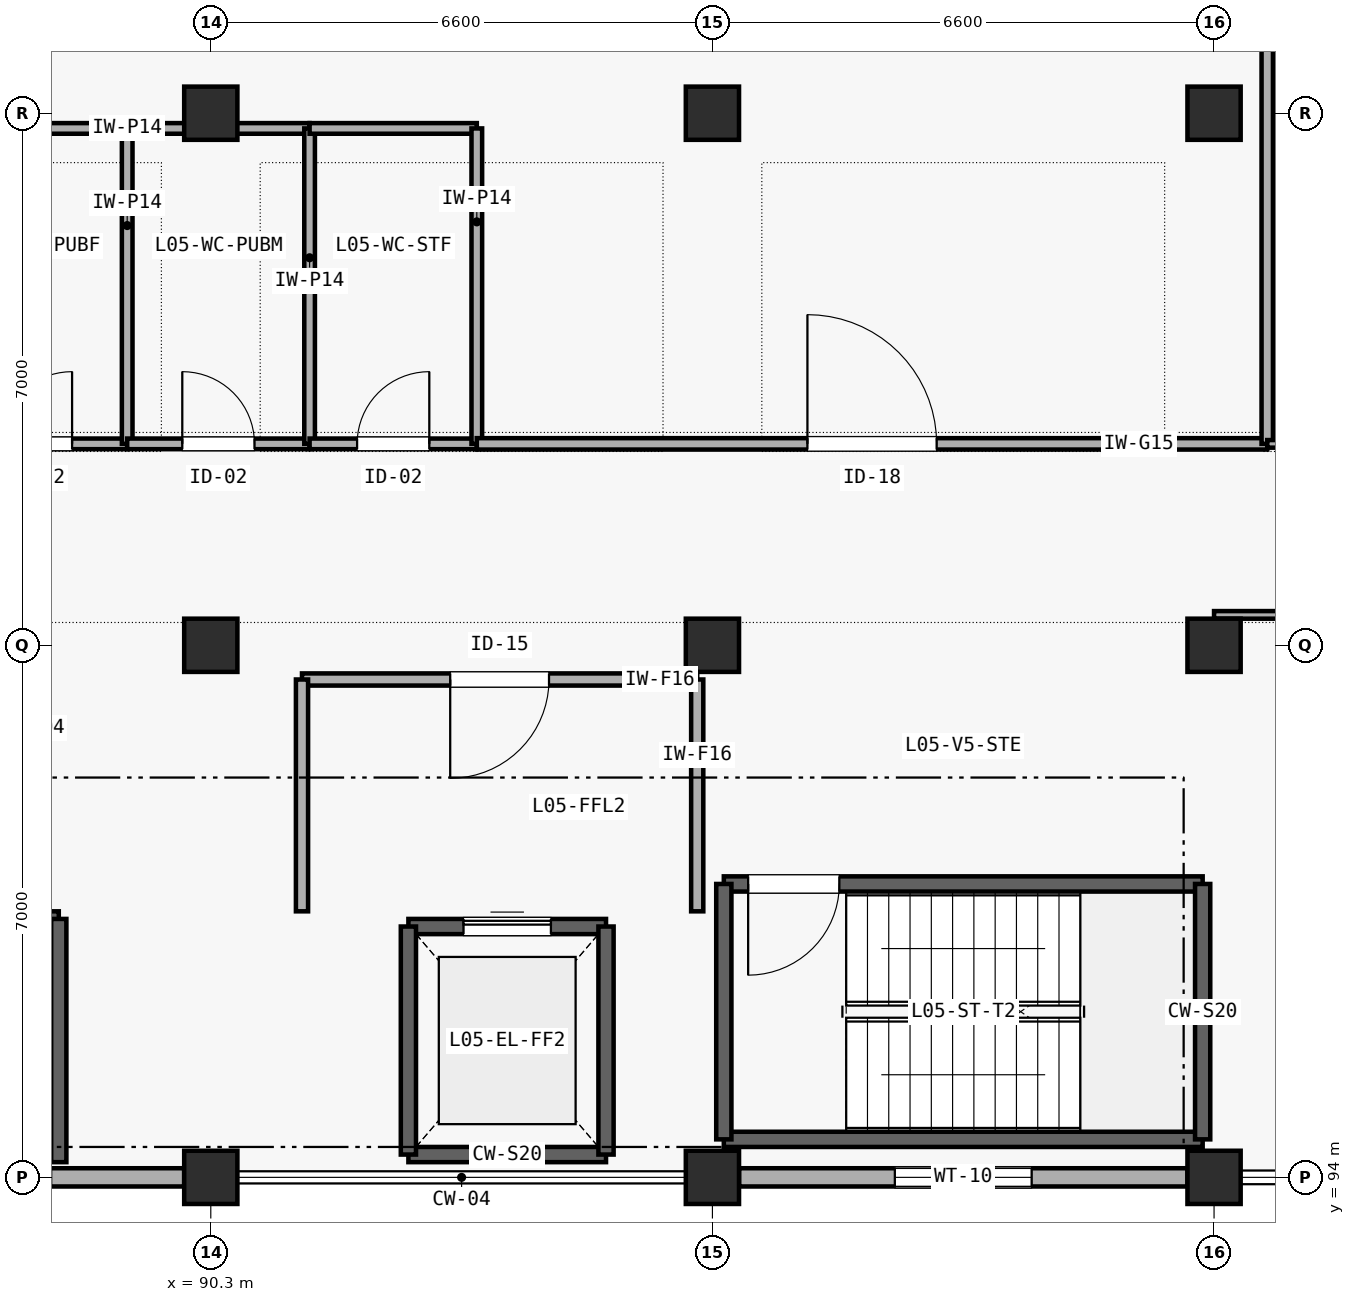
"""IFC4 building model, lengths in metres.
Left out: names, types, materials, properties, quantities, classifications, styles, units other than length and angle.
Written with IfcOpenShell. Run it as: python <this file> out.ifc"""

import sys

from ifc_helpers import new_model, si_unit, direction, frame, frame_2d, origin, origin_2d, place, context, subcontext, project, spatial, rectangle, extrude, element, fill, save


model = new_model("IFC4")
c1 = context("Model", 3, precision=1e-05, world=origin(), true_north=direction((0.0, 1.0)))
c2 = subcontext(c1, "Body", "Model", "MODEL_VIEW")
j1 = project(units=[si_unit("LENGTHUNIT", "METRE"), si_unit("PLANEANGLEUNIT", "RADIAN")], contexts=[c1])
p1 = place(None, origin())
s1 = spatial("IfcSite", under=j1, at=p1, CompositionType="ELEMENT")
p2 = place(p1, origin())
s2 = spatial("IfcBuilding", under=s1, at=p2, CompositionType="ELEMENT")
p3 = place(p2, frame((0.0, 0.0, 21.0)))
s3 = spatial("IfcBuildingStorey", under=s2, at=p3, CompositionType="ELEMENT", Elevation=21.0)
for number, where, z_axis, x_axis in (
    (1, (90.3, 94.0, 0.0), (0.0, 0.0, 1.0), (1.0, 0.0, 0.0)),
    (2, (90.3, 101.0, 0.0), (0.0, 0.0, 1.0), (1.0, 0.0, 0.0)),
    (3, (90.3, 108.0, 0.0), (0.0, 0.0, 1.0), (1.0, 0.0, 0.0)),
    (4, (96.9, 94.0, 0.0), (0.0, 0.0, 1.0), (1.0, 0.0, 0.0)),
    (5, (96.9, 101.0, 0.0), (0.0, 0.0, 1.0), (1.0, 0.0, 0.0)),
    (6, (96.9, 108.0, 0.0), (0.0, 0.0, 1.0), (1.0, 0.0, 0.0)),
    (7, (103.5, 94.0, 0.0), (0.0, 0.0, 1.0), (1.0, 0.0, 0.0)),
    (8, (103.5, 101.0, 0.0), (0.0, 0.0, 1.0), (1.0, 0.0, 0.0)),
    (9, (103.5, 108.0, 0.0), (0.0, 0.0, 1.0), (1.0, 0.0, 0.0)),
):
    element("IfcColumn", number, at=place(p3, frame(where, z_axis=z_axis, x_axis=x_axis)), inside=s3, PredefinedType="COLUMN", context=c2, shape_type="SweptSolid", body=[
        extrude(rectangle(XDim=0.7, YDim=0.7, at=origin_2d()), origin(), (0.0, 0.0, 1.0), 4.2),
    ])
p4 = place(p3, frame((84.05, 94.0, 0.0), z_axis=(0.0, 0.0, 1.0), x_axis=(1.0, 0.0, 0.0)))
e10 = element("IfcWall", 10, at=p4, inside=s3, PredefinedType="SOLIDWALL", context=c2, shape_type="SweptSolid", body=[
    extrude(rectangle(XDim=5.9, YDim=0.24, at=frame_2d((2.95, 0.0))), origin(), (0.0, 0.0, 1.0), 3.135),
])
p5 = place(p4, frame((1.75, 0.0, 0.85)))
e11 = element("IfcOpeningElement", 11, at=p5, cuts=e10, PredefinedType="OPENING", context=c2, shape_type="SweptSolid", body=[
    extrude(rectangle(XDim=2.4, YDim=1.35, at=frame_2d((1.2, 0.675))), frame((0.0, 0.13, 0.0), z_axis=(0.0, -1.0, 0.0), x_axis=(1.0, 0.0, 0.0)), (0.0, 0.0, 1.0), 0.26),
])
p6 = place(p3, frame((97.25, 94.0, 0.0), z_axis=(0.0, 0.0, 1.0), x_axis=(1.0, 0.0, 0.0)))
e12 = element("IfcWall", 12, at=p6, inside=s3, PredefinedType="SOLIDWALL", context=c2, shape_type="SweptSolid", body=[
    extrude(rectangle(XDim=5.9, YDim=0.24, at=frame_2d((2.95, 0.0))), origin(), (0.0, 0.0, 1.0), 3.235),
])
p7 = place(p6, frame((2.05, 0.0, 0.85)))
e13 = element("IfcOpeningElement", 13, at=p7, cuts=e12, PredefinedType="OPENING", context=c2, shape_type="SweptSolid", body=[
    extrude(rectangle(XDim=1.8, YDim=1.5, at=frame_2d((0.9, 0.75))), frame((0.0, 0.13, 0.0), z_axis=(0.0, -1.0, 0.0), x_axis=(1.0, 0.0, 0.0)), (0.0, 0.0, 1.0), 0.26),
])
p8 = place(p3, frame((97.05, 94.5, 0.0), z_axis=(0.0, 0.0, 1.0), x_axis=(1.0, 0.0, 0.0)))
e14 = element("IfcWall", 14, at=p8, inside=s3, PredefinedType="SHEAR", context=c2, shape_type="SweptSolid", body=[
    extrude(rectangle(XDim=6.3, YDim=0.2, at=frame_2d((3.15, 0.0))), origin(), (0.0, 0.0, 1.0), 4.2),
])
p9 = place(p3, frame((97.05, 97.86, 0.0), z_axis=(0.0, 0.0, 1.0), x_axis=(1.0, 0.0, 0.0)))
e15 = element("IfcWall", 15, at=p9, inside=s3, PredefinedType="SHEAR", context=c2, shape_type="SweptSolid", body=[
    extrude(rectangle(XDim=6.3, YDim=0.2, at=frame_2d((3.15, 0.0))), origin(), (0.0, 0.0, 1.0), 4.2),
])
p10 = place(p9, frame((0.32, 0.0, 0.0)))
e16 = element("IfcOpeningElement", 16, at=p10, cuts=e15, PredefinedType="OPENING", context=c2, shape_type="SweptSolid", body=[
    extrude(rectangle(XDim=1.2, YDim=2.15, at=frame_2d((0.6, 1.075))), frame((0.0, 0.11, 0.0), z_axis=(0.0, -1.0, 0.0), x_axis=(1.0, 0.0, 0.0)), (0.0, 0.0, 1.0), 0.22),
])
for number, where, z_axis, x_axis in (
    (17, (97.05, 94.5, 0.0), (0.0, 0.0, 1.0), (0.0, 1.0, 0.0)),
    (18, (103.35, 94.5, 0.0), (0.0, 0.0, 1.0), (0.0, 1.0, 0.0)),
):
    element("IfcWall", number, at=place(p3, frame(where, z_axis=z_axis, x_axis=x_axis)), inside=s3, PredefinedType="SHEAR", context=c2, shape_type="SweptSolid", body=[
        extrude(rectangle(XDim=3.36, YDim=0.2, at=frame_2d((1.68, 0.0))), origin(), (0.0, 0.0, 1.0), 4.2),
    ])
p11 = place(p3, frame((92.9, 94.3, 0.0), z_axis=(0.0, 0.0, 1.0), x_axis=(1.0, 0.0, 0.0)))
e19 = element("IfcWall", 19, at=p11, inside=s3, PredefinedType="SHEAR", context=c2, shape_type="SweptSolid", body=[
    extrude(rectangle(XDim=2.6, YDim=0.2, at=frame_2d((1.3, 0.0))), origin(), (0.0, 0.0, 1.0), 4.2),
])
p12 = place(p3, frame((92.9, 97.3, 0.0), z_axis=(0.0, 0.0, 1.0), x_axis=(1.0, 0.0, 0.0)))
e20 = element("IfcWall", 20, at=p12, inside=s3, PredefinedType="SHEAR", context=c2, shape_type="SweptSolid", body=[
    extrude(rectangle(XDim=2.6, YDim=0.2, at=frame_2d((1.3, 0.0))), origin(), (0.0, 0.0, 1.0), 4.2),
])
p13 = place(p12, frame((0.725, 0.0, 0.0)))
e21 = element("IfcOpeningElement", 21, at=p13, cuts=e20, PredefinedType="OPENING", context=c2, shape_type="SweptSolid", body=[
    extrude(rectangle(XDim=1.15, YDim=2.2, at=frame_2d((0.575, 1.1))), frame((0.0, 0.11, 0.0), z_axis=(0.0, -1.0, 0.0), x_axis=(1.0, 0.0, 0.0)), (0.0, 0.0, 1.0), 0.22),
])
for number, where, z_axis, x_axis in (
    (22, (92.9, 94.3, 0.0), (0.0, 0.0, 1.0), (0.0, 1.0, 0.0)),
    (23, (95.5, 94.3, 0.0), (0.0, 0.0, 1.0), (0.0, 1.0, 0.0)),
):
    element("IfcWall", number, at=place(p3, frame(where, z_axis=z_axis, x_axis=x_axis)), inside=s3, PredefinedType="SHEAR", context=c2, shape_type="SweptSolid", body=[
        extrude(rectangle(XDim=3.0, YDim=0.2, at=frame_2d((1.5, 0.0))), origin(), (0.0, 0.0, 1.0), 4.2),
    ])
p14 = place(p3, frame((85.7, 97.4, 0.0), z_axis=(0.0, 0.0, 1.0), x_axis=(1.0, 0.0, 0.0)))
e24 = element("IfcWall", 24, at=p14, inside=s3, PredefinedType="SHEAR", context=c2, shape_type="SweptSolid", body=[
    extrude(rectangle(XDim=2.6, YDim=0.2, at=frame_2d((1.3, 0.0))), origin(), (0.0, 0.0, 1.0), 4.2),
])
p15 = place(p14, frame((0.7, 0.0, 0.0)))
e25 = element("IfcOpeningElement", 25, at=p15, cuts=e24, PredefinedType="OPENING", context=c2, shape_type="SweptSolid", body=[
    extrude(rectangle(XDim=1.2, YDim=2.2, at=frame_2d((0.6, 1.1))), frame((0.0, 0.11, 0.0), z_axis=(0.0, -1.0, 0.0), x_axis=(1.0, 0.0, 0.0)), (0.0, 0.0, 1.0), 0.22),
])
p16 = place(p3, frame((88.3, 94.2, 0.0), z_axis=(0.0, 0.0, 1.0), x_axis=(0.0, 1.0, 0.0)))
e26 = element("IfcWall", 26, at=p16, inside=s3, PredefinedType="SHEAR", context=c2, shape_type="SweptSolid", body=[
    extrude(rectangle(XDim=3.2, YDim=0.2, at=frame_2d((1.6, 0.0))), origin(), (0.0, 0.0, 1.0), 4.2),
])
p17 = place(p3, frame((91.5, 100.55, 0.0), z_axis=(0.0, 0.0, 1.0), x_axis=(1.0, 0.0, 0.0)))
e27 = element("IfcWall", 27, at=p17, inside=s3, PredefinedType="SOLIDWALL", context=c2, shape_type="SweptSolid", body=[
    extrude(rectangle(XDim=5.2, YDim=0.16, at=frame_2d((2.6, 0.0))), origin(), (0.0, 0.0, 1.0), 3.9),
])
p18 = place(p17, frame((1.95, 0.0, 0.0)))
e28 = element("IfcOpeningElement", 28, at=p18, cuts=e27, PredefinedType="OPENING", context=c2, shape_type="SweptSolid", body=[
    extrude(rectangle(XDim=1.3, YDim=2.15, at=frame_2d((0.65, 1.075))), frame((0.0, 0.09, 0.0), z_axis=(0.0, -1.0, 0.0), x_axis=(1.0, 0.0, 0.0)), (0.0, 0.0, 1.0), 0.18),
])
p19 = place(p3, frame((91.5, 97.5, 0.0), z_axis=(0.0, 0.0, 1.0), x_axis=(0.0, 1.0, 0.0)))
e29 = element("IfcWall", 29, at=p19, inside=s3, PredefinedType="SOLIDWALL", context=c2, shape_type="SweptSolid", body=[
    extrude(rectangle(XDim=3.05, YDim=0.16, at=frame_2d((1.525, 0.0))), origin(), (0.0, 0.0, 1.0), 3.9),
])
p20 = place(p3, frame((96.7, 97.5, 0.0), z_axis=(0.0, 0.0, 1.0), x_axis=(0.0, 1.0, 0.0)))
e30 = element("IfcWall", 30, at=p20, inside=s3, PredefinedType="SOLIDWALL", context=c2, shape_type="SweptSolid", body=[
    extrude(rectangle(XDim=3.05, YDim=0.16, at=frame_2d((1.525, 0.0))), origin(), (0.0, 0.0, 1.0), 3.405),
])
p21 = place(p3, frame((86.8, 103.65, 0.0), z_axis=(0.0, 0.0, 1.0), x_axis=(1.0, 0.0, 0.0)))
e31 = element("IfcWall", 31, at=p21, inside=s3, PredefinedType="PLUMBINGWALL", context=c2, shape_type="SweptSolid", body=[
    extrude(rectangle(XDim=2.4, YDim=0.14, at=frame_2d((1.2, 0.0))), origin(), (0.0, 0.0, 1.0), 3.9),
])
p22 = place(p21, frame((0.725, 0.0, 0.0)))
e32 = element("IfcOpeningElement", 32, at=p22, cuts=e31, PredefinedType="OPENING", context=c2, shape_type="SweptSolid", body=[
    extrude(rectangle(XDim=0.95, YDim=2.1, at=frame_2d((0.475, 1.05))), frame((0.0, 0.08, 0.0), z_axis=(0.0, -1.0, 0.0), x_axis=(1.0, 0.0, 0.0)), (0.0, 0.0, 1.0), 0.16),
])
p23 = place(p3, frame((86.8, 107.8, 0.0), z_axis=(0.0, 0.0, 1.0), x_axis=(1.0, 0.0, 0.0)))
e33 = element("IfcWall", 33, at=p23, inside=s3, PredefinedType="PLUMBINGWALL", context=c2, shape_type="SweptSolid", body=[
    extrude(rectangle(XDim=2.4, YDim=0.14, at=frame_2d((1.2, 0.0))), origin(), (0.0, 0.0, 1.0), 3.135),
])
p24 = place(p3, frame((89.2, 103.65, 0.0), z_axis=(0.0, 0.0, 1.0), x_axis=(0.0, 1.0, 0.0)))
e34 = element("IfcWall", 34, at=p24, inside=s3, PredefinedType="PLUMBINGWALL", context=c2, shape_type="SweptSolid", body=[
    extrude(rectangle(XDim=4.15, YDim=0.14, at=frame_2d((2.075, 0.0))), origin(), (0.0, 0.0, 1.0), 3.9),
])
p25 = place(p3, frame((89.2, 103.65, 0.0), z_axis=(0.0, 0.0, 1.0), x_axis=(1.0, 0.0, 0.0)))
e35 = element("IfcWall", 35, at=p25, inside=s3, PredefinedType="PLUMBINGWALL", context=c2, shape_type="SweptSolid", body=[
    extrude(rectangle(XDim=2.4, YDim=0.14, at=frame_2d((1.2, 0.0))), origin(), (0.0, 0.0, 1.0), 3.9),
])
p26 = place(p25, frame((0.725, 0.0, 0.0)))
e36 = element("IfcOpeningElement", 36, at=p26, cuts=e35, PredefinedType="OPENING", context=c2, shape_type="SweptSolid", body=[
    extrude(rectangle(XDim=0.95, YDim=2.1, at=frame_2d((0.475, 1.05))), frame((0.0, 0.08, 0.0), z_axis=(0.0, -1.0, 0.0), x_axis=(1.0, 0.0, 0.0)), (0.0, 0.0, 1.0), 0.16),
])
p27 = place(p3, frame((89.2, 107.8, 0.0), z_axis=(0.0, 0.0, 1.0), x_axis=(1.0, 0.0, 0.0)))
e37 = element("IfcWall", 37, at=p27, inside=s3, PredefinedType="PLUMBINGWALL", context=c2, shape_type="SweptSolid", body=[
    extrude(rectangle(XDim=2.4, YDim=0.14, at=frame_2d((1.2, 0.0))), origin(), (0.0, 0.0, 1.0), 3.135),
])
p28 = place(p3, frame((91.6, 103.65, 0.0), z_axis=(0.0, 0.0, 1.0), x_axis=(0.0, 1.0, 0.0)))
e38 = element("IfcWall", 38, at=p28, inside=s3, PredefinedType="PLUMBINGWALL", context=c2, shape_type="SweptSolid", body=[
    extrude(rectangle(XDim=4.15, YDim=0.14, at=frame_2d((2.075, 0.0))), origin(), (0.0, 0.0, 1.0), 3.9),
])
p29 = place(p3, frame((91.6, 103.65, 0.0), z_axis=(0.0, 0.0, 1.0), x_axis=(1.0, 0.0, 0.0)))
e39 = element("IfcWall", 39, at=p29, inside=s3, PredefinedType="PLUMBINGWALL", context=c2, shape_type="SweptSolid", body=[
    extrude(rectangle(XDim=2.2, YDim=0.14, at=frame_2d((1.1, 0.0))), origin(), (0.0, 0.0, 1.0), 3.9),
])
p30 = place(p29, frame((0.625, 0.0, 0.0)))
e40 = element("IfcOpeningElement", 40, at=p30, cuts=e39, PredefinedType="OPENING", context=c2, shape_type="SweptSolid", body=[
    extrude(rectangle(XDim=0.95, YDim=2.1, at=frame_2d((0.475, 1.05))), frame((0.0, 0.08, 0.0), z_axis=(0.0, -1.0, 0.0), x_axis=(1.0, 0.0, 0.0)), (0.0, 0.0, 1.0), 0.16),
])
p31 = place(p3, frame((91.6, 107.8, 0.0), z_axis=(0.0, 0.0, 1.0), x_axis=(1.0, 0.0, 0.0)))
e41 = element("IfcWall", 41, at=p31, inside=s3, PredefinedType="PLUMBINGWALL", context=c2, shape_type="SweptSolid", body=[
    extrude(rectangle(XDim=2.2, YDim=0.14, at=frame_2d((1.1, 0.0))), origin(), (0.0, 0.0, 1.0), 3.135),
])
p32 = place(p3, frame((93.8, 103.65, 0.0), z_axis=(0.0, 0.0, 1.0), x_axis=(0.0, 1.0, 0.0)))
e42 = element("IfcWall", 42, at=p32, inside=s3, PredefinedType="PLUMBINGWALL", context=c2, shape_type="SweptSolid", body=[
    extrude(rectangle(XDim=4.15, YDim=0.14, at=frame_2d((2.075, 0.0))), origin(), (0.0, 0.0, 1.0), 3.9),
])
p33 = place(p3, frame((93.8, 103.65, 0.0), z_axis=(0.0, 0.0, 1.0), x_axis=(1.0, 0.0, 0.0)))
e43 = element("IfcWall", 43, at=p33, inside=s3, PredefinedType="PARTITIONING", context=c2, shape_type="SweptSolid", body=[
    extrude(rectangle(XDim=10.4, YDim=0.15, at=frame_2d((5.2, 0.0))), origin(), (0.0, 0.0, 1.0), 3.9),
])
p34 = place(p33, frame((4.35, 0.0, 0.0)))
e44 = element("IfcOpeningElement", 44, at=p34, cuts=e43, PredefinedType="OPENING", context=c2, shape_type="SweptSolid", body=[
    extrude(rectangle(XDim=1.7, YDim=2.2, at=frame_2d((0.85, 1.1))), frame((0.0, 0.085, 0.0), z_axis=(0.0, -1.0, 0.0), x_axis=(1.0, 0.0, 0.0)), (0.0, 0.0, 1.0), 0.17),
])
p35 = place(p3, frame((104.2, 103.65, 0.0), z_axis=(0.0, 0.0, 1.0), x_axis=(0.0, 1.0, 0.0)))
e45 = element("IfcWall", 45, at=p35, inside=s3, PredefinedType="PARTITIONING", context=c2, shape_type="SweptSolid", body=[
    extrude(rectangle(XDim=11.15, YDim=0.15, at=frame_2d((5.575, 0.0))), origin(), (0.0, 0.0, 1.0), 3.9),
])
p36 = place(p3, frame((104.2, 103.65, 0.0), z_axis=(0.0, 0.0, 1.0), x_axis=(1.0, 0.0, 0.0)))
e46 = element("IfcWall", 46, at=p36, inside=s3, PredefinedType="PARTITIONING", context=c2, shape_type="SweptSolid", body=[
    extrude(rectangle(XDim=5.7, YDim=0.1, at=frame_2d((2.85, 0.0))), origin(), (0.0, 0.0, 1.0), 3.9),
])
p37 = place(p36, frame((2.4, 0.0, 0.0)))
e47 = element("IfcOpeningElement", 47, at=p37, cuts=e46, PredefinedType="OPENING", context=c2, shape_type="SweptSolid", body=[
    extrude(rectangle(XDim=0.9, YDim=2.1, at=frame_2d((0.45, 1.05))), frame((0.0, 0.06, 0.0), z_axis=(0.0, -1.0, 0.0), x_axis=(1.0, 0.0, 0.0)), (0.0, 0.0, 1.0), 0.12),
])
p38 = place(p3, frame((103.5, 101.4, 0.0), z_axis=(0.0, 0.0, 1.0), x_axis=(1.0, 0.0, 0.0)))
e48 = element("IfcWall", 48, at=p38, inside=s3, PredefinedType="PARTITIONING", context=c2, shape_type="SweptSolid", body=[
    extrude(rectangle(XDim=6.4, YDim=0.1, at=frame_2d((3.2, 0.0))), origin(), (0.0, 0.0, 1.0), 3.9),
])
p39 = place(p38, frame((2.7, 0.0, 0.0)))
e49 = element("IfcOpeningElement", 49, at=p39, cuts=e48, PredefinedType="OPENING", context=c2, shape_type="SweptSolid", body=[
    extrude(rectangle(XDim=1.0, YDim=2.1, at=frame_2d((0.5, 1.05))), frame((0.0, 0.06, 0.0), z_axis=(0.0, -1.0, 0.0), x_axis=(1.0, 0.0, 0.0)), (0.0, 0.0, 1.0), 0.12),
])
p40 = place(p7, origin())
e50 = element("IfcWindow", 50, at=p40, inside=s3, PartitioningType="SINGLE_PANEL", PredefinedType="WINDOW", context=c2, shape_type="SweptSolid", body=[
    extrude(rectangle(XDim=1.8, YDim=1.5, at=frame_2d((0.9, 0.75))), frame((0.0, 0.03, 0.0), z_axis=(0.0, -1.0, 0.0), x_axis=(1.0, 0.0, 0.0)), (0.0, 0.0, 1.0), 0.06),
])
fill(e13, e50)
p41 = place(p10, frame((1.2, 0.0, 0.0), z_axis=(0.0, 0.0, 1.0), x_axis=(-1.0, 0.0, 0.0)))
e51 = element("IfcDoor", 51, at=p41, inside=s3, OperationType="SINGLE_SWING_RIGHT", PredefinedType="DOOR", context=c2, shape_type="SweptSolid", body=[
    extrude(rectangle(XDim=1.2, YDim=2.15, at=frame_2d((0.6, 1.075))), frame((0.0, 0.025, 0.0), z_axis=(0.0, -1.0, 0.0), x_axis=(1.0, 0.0, 0.0)), (0.0, 0.0, 1.0), 0.05),
])
fill(e16, e51)
p42 = place(p13, origin())
e52 = element("IfcDoor", 52, at=p42, inside=s3, OperationType="SLIDING_TO_LEFT", PredefinedType="DOOR", context=c2, shape_type="SweptSolid", body=[
    extrude(rectangle(XDim=1.15, YDim=2.2, at=frame_2d((0.575, 1.1))), frame((0.0, 0.025, 0.0), z_axis=(0.0, -1.0, 0.0), x_axis=(1.0, 0.0, 0.0)), (0.0, 0.0, 1.0), 0.05),
])
fill(e21, e52)
p43 = place(p18, frame((1.3, 0.0, 0.0), z_axis=(0.0, 0.0, 1.0), x_axis=(-1.0, 0.0, 0.0)))
e53 = element("IfcDoor", 53, at=p43, inside=s3, OperationType="SINGLE_SWING_RIGHT", PredefinedType="DOOR", context=c2, shape_type="SweptSolid", body=[
    extrude(rectangle(XDim=1.3, YDim=2.15, at=frame_2d((0.65, 1.075))), frame((0.0, 0.025, 0.0), z_axis=(0.0, -1.0, 0.0), x_axis=(1.0, 0.0, 0.0)), (0.0, 0.0, 1.0), 0.05),
])
fill(e28, e53)
p44 = place(p22, origin())
e54 = element("IfcDoor", 54, at=p44, inside=s3, OperationType="SINGLE_SWING_RIGHT", PredefinedType="DOOR", context=c2, shape_type="SweptSolid", body=[
    extrude(rectangle(XDim=0.95, YDim=2.1, at=frame_2d((0.475, 1.05))), frame((0.0, 0.025, 0.0), z_axis=(0.0, -1.0, 0.0), x_axis=(1.0, 0.0, 0.0)), (0.0, 0.0, 1.0), 0.05),
])
fill(e32, e54)
p45 = place(p26, origin())
e55 = element("IfcDoor", 55, at=p45, inside=s3, OperationType="SINGLE_SWING_LEFT", PredefinedType="DOOR", context=c2, shape_type="SweptSolid", body=[
    extrude(rectangle(XDim=0.95, YDim=2.1, at=frame_2d((0.475, 1.05))), frame((0.0, 0.025, 0.0), z_axis=(0.0, -1.0, 0.0), x_axis=(1.0, 0.0, 0.0)), (0.0, 0.0, 1.0), 0.05),
])
fill(e36, e55)
p46 = place(p30, origin())
e56 = element("IfcDoor", 56, at=p46, inside=s3, OperationType="SINGLE_SWING_RIGHT", PredefinedType="DOOR", context=c2, shape_type="SweptSolid", body=[
    extrude(rectangle(XDim=0.95, YDim=2.1, at=frame_2d((0.475, 1.05))), frame((0.0, 0.025, 0.0), z_axis=(0.0, -1.0, 0.0), x_axis=(1.0, 0.0, 0.0)), (0.0, 0.0, 1.0), 0.05),
])
fill(e40, e56)
p47 = place(p34, origin())
e57 = element("IfcDoor", 57, at=p47, inside=s3, OperationType="SINGLE_SWING_LEFT", PredefinedType="DOOR", context=c2, shape_type="SweptSolid", body=[
    extrude(rectangle(XDim=1.7, YDim=2.2, at=frame_2d((0.85, 1.1))), frame((0.0, 0.025, 0.0), z_axis=(0.0, -1.0, 0.0), x_axis=(1.0, 0.0, 0.0)), (0.0, 0.0, 1.0), 0.05),
])
fill(e44, e57)
save(model, sys.argv[1])
